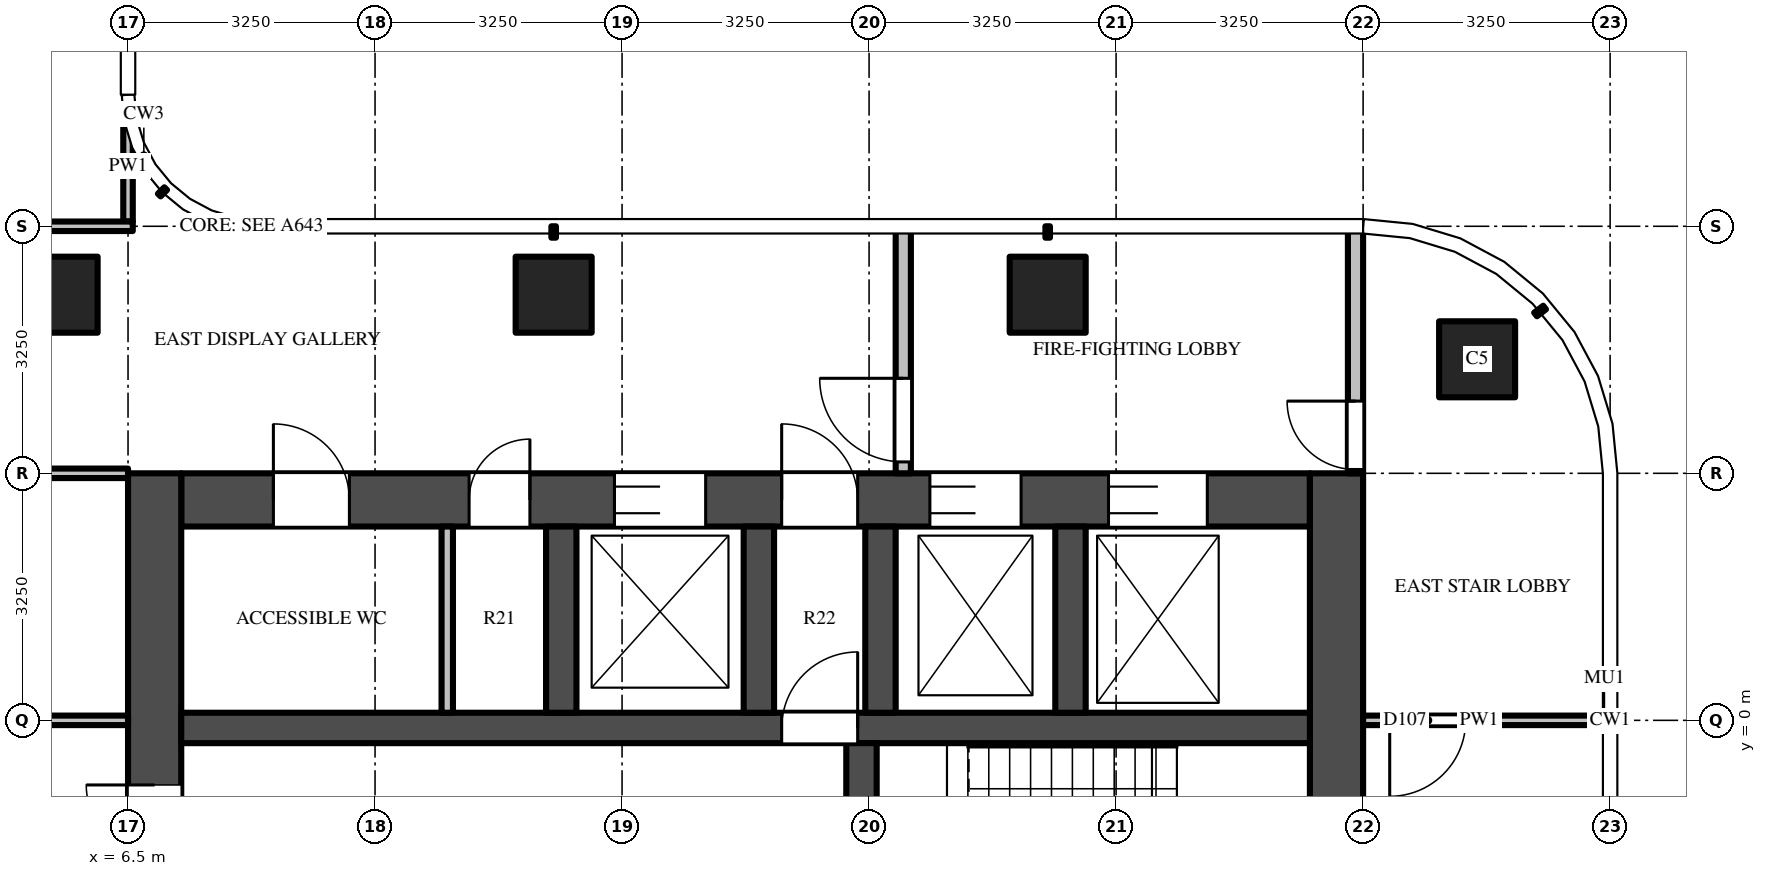
"""IFC4 building model, lengths in metres.
Left out: names, types, materials, properties, quantities, classifications, styles, units other than length and angle.
Written with IfcOpenShell. Run it as: python <this file> out.ifc"""

import sys

from ifc_helpers import new_model, si_unit, direction, frame, frame_2d, origin, origin_2d, place, context, subcontext, project, spatial, rectangle, extrude, source, transform, mapped, element, fill, save


model = new_model("IFC4")
c1 = context("Model", 3, precision=1e-05, world=origin(), true_north=direction((0.0, 1.0)))
c2 = subcontext(c1, "Body", "Model", "MODEL_VIEW")
j1 = project(units=[si_unit("LENGTHUNIT", "METRE"), si_unit("PLANEANGLEUNIT", "RADIAN")], contexts=[c1])
p1 = place(None, origin())
s1 = spatial("IfcSite", under=j1, at=p1, CompositionType="ELEMENT")
p2 = place(p1, origin())
s2 = spatial("IfcBuilding", under=s1, at=p2, CompositionType="ELEMENT")
p3 = place(p2, frame((0.0, 0.0, 326.2)))
s3 = spatial("IfcBuildingStorey", under=s2, at=p3, CompositionType="ELEMENT", Elevation=326.2)
m1 = source(origin(), c2, "Body", "SweptSolid", [
    extrude(rectangle(XDim=1.0, YDim=1.0, at=origin_2d()), origin(), (0.0, 0.0, 1.0), 3.9),
])
for number, where, z_axis, x_axis in (
    (1, (12.1, 5.6, 0.0), (0.0, 0.0, 1.0), (1.0, 0.0, 0.0)),
    (2, (18.6, 5.6, 0.0), (0.0, 0.0, 1.0), (1.0, 0.0, 0.0)),
    (3, (24.25, 4.75, 0.0), (0.0, 0.0, 1.0), (1.0, 0.0, 0.0)),
    (4, (5.6, 5.6, 0.0), (0.0, 0.0, 1.0), (1.0, 0.0, 0.0)),
):
    element("IfcColumn", number, at=place(p3, frame(where, z_axis=z_axis, x_axis=x_axis)), inside=s3, PredefinedType="COLUMN", context=c2, shape_type="MappedRepresentation", body=[
        mapped(m1, transform((0.0, 0.0, 0.0))),
    ])
m2 = source(origin(), c2, "Body", "SweptSolid", [
    extrude(rectangle(XDim=14.85, YDim=0.7, at=frame_2d((7.425, 0.0))), origin(), (0.0, 0.0, 1.0), 3.5),
])
p4 = place(p3, frame((7.2, 2.9, 0.0), z_axis=(0.0, 0.0, 1.0), x_axis=(1.0, 0.0, 0.0)))
e5 = element("IfcWall", 5, at=p4, inside=s3, PredefinedType="SHEAR", context=c2, shape_type="MappedRepresentation", body=[
    mapped(m2, transform((0.0, 0.0, 0.0))),
])
m3 = source(origin(), c2, "Body", "SweptSolid", [
    extrude(rectangle(XDim=1.2, YDim=2.1, at=frame_2d((0.6, 1.05))), frame((0.0, 0.36, 0.0), z_axis=(0.0, -1.0, 0.0), x_axis=(1.0, 0.0, 0.0)), (0.0, 0.0, 1.0), 0.72),
])
p5 = place(p4, frame((5.7, 0.0, 0.0)))
e6 = element("IfcOpeningElement", 6, at=p5, cuts=e5, PredefinedType="OPENING", context=c2, shape_type="MappedRepresentation", body=[
    mapped(m3, transform((0.0, 0.0, 0.0))),
])
m4 = source(origin(), c2, "Body", "SweptSolid", [
    extrude(rectangle(XDim=1.3, YDim=2.1, at=frame_2d((0.65, 1.05))), frame((0.0, 0.36, 0.0), z_axis=(0.0, -1.0, 0.0), x_axis=(1.0, 0.0, 0.0)), (0.0, 0.0, 1.0), 0.72),
])
p6 = place(p4, frame((12.2, 0.0, 0.0)))
e7 = element("IfcOpeningElement", 7, at=p6, cuts=e5, PredefinedType="OPENING", context=c2, shape_type="MappedRepresentation", body=[
    mapped(m4, transform((0.0, 0.0, 0.0))),
])
p7 = place(p4, frame((9.85, 0.0, 0.0)))
e8 = element("IfcOpeningElement", 8, at=p7, cuts=e5, PredefinedType="OPENING", context=c2, shape_type="MappedRepresentation", body=[
    mapped(m3, transform((0.0, 0.0, 0.0))),
])
m5 = source(origin(), c2, "Body", "SweptSolid", [
    extrude(rectangle(XDim=1.0, YDim=2.1, at=frame_2d((0.5, 1.05))), frame((0.0, 0.36, 0.0), z_axis=(0.0, -1.0, 0.0), x_axis=(1.0, 0.0, 0.0)), (0.0, 0.0, 1.0), 0.72),
])
p8 = place(p4, frame((7.9, 0.0, 0.0)))
e9 = element("IfcOpeningElement", 9, at=p8, cuts=e5, PredefinedType="OPENING", context=c2, shape_type="MappedRepresentation", body=[
    mapped(m5, transform((0.0, 0.0, 0.0))),
])
p9 = place(p4, frame((1.212, 0.0, 0.0)))
e10 = element("IfcOpeningElement", 10, at=p9, cuts=e5, PredefinedType="OPENING", context=c2, shape_type="MappedRepresentation", body=[
    mapped(m5, transform((0.0, 0.0, 0.0))),
])
m6 = source(origin(), c2, "Body", "SweptSolid", [
    extrude(rectangle(XDim=0.8, YDim=2.1, at=frame_2d((0.4, 1.05))), frame((0.0, 0.36, 0.0), z_axis=(0.0, -1.0, 0.0), x_axis=(1.0, 0.0, 0.0)), (0.0, 0.0, 1.0), 0.72),
])
p10 = place(p4, frame((3.788, 0.0, 0.0)))
e11 = element("IfcOpeningElement", 11, at=p10, cuts=e5, PredefinedType="OPENING", context=c2, shape_type="MappedRepresentation", body=[
    mapped(m6, transform((0.0, 0.0, 0.0))),
])
m7 = source(origin(), c2, "Body", "SweptSolid", [
    extrude(rectangle(XDim=9.05, YDim=0.7, at=frame_2d((4.525, 0.0))), origin(), (0.0, 0.0, 1.0), 3.5),
])
p11 = place(p3, frame((6.85, -5.8, 0.0), z_axis=(0.0, 0.0, 1.0), x_axis=(0.0, 1.0, 0.0)))
e12 = element("IfcWall", 12, at=p11, inside=s3, PredefinedType="SHEAR", context=c2, shape_type="MappedRepresentation", body=[
    mapped(m7, transform((0.0, 0.0, 0.0))),
])
m8 = source(origin(), c2, "Body", "SweptSolid", [
    extrude(rectangle(XDim=1.8, YDim=2.1, at=frame_2d((0.9, 1.05))), frame((0.0, 0.36, 0.0), z_axis=(0.0, -1.0, 0.0), x_axis=(1.0, 0.0, 0.0)), (0.0, 0.0, 1.0), 0.72),
])
p12 = place(p11, frame((3.15, 0.0, 0.0)))
e13 = element("IfcOpeningElement", 13, at=p12, cuts=e12, PredefinedType="OPENING", context=c2, shape_type="MappedRepresentation", body=[
    mapped(m8, transform((0.0, 0.0, 0.0))),
])
p13 = place(p3, frame((22.4, -5.8, 0.0), z_axis=(0.0, 0.0, 1.0), x_axis=(0.0, 1.0, 0.0)))
e14 = element("IfcWall", 14, at=p13, inside=s3, PredefinedType="SHEAR", context=c2, shape_type="MappedRepresentation", body=[
    mapped(m7, transform((0.0, 0.0, 0.0))),
])
m9 = source(origin(), c2, "Body", "SweptSolid", [
    extrude(rectangle(XDim=14.85, YDim=0.4, at=frame_2d((7.425, 0.0))), origin(), (0.0, 0.0, 1.0), 3.5),
])
p14 = place(p3, frame((7.2, -0.1, 0.0), z_axis=(0.0, 0.0, 1.0), x_axis=(1.0, 0.0, 0.0)))
e15 = element("IfcWall", 15, at=p14, inside=s3, PredefinedType="SHEAR", context=c2, shape_type="MappedRepresentation", body=[
    mapped(m9, transform((0.0, 0.0, 0.0))),
])
m10 = source(origin(), c2, "Body", "SweptSolid", [
    extrude(rectangle(XDim=1.0, YDim=2.1, at=frame_2d((0.5, 1.05))), frame((0.0, 0.21, 0.0), z_axis=(0.0, -1.0, 0.0), x_axis=(1.0, 0.0, 0.0)), (0.0, 0.0, 1.0), 0.42),
])
p15 = place(p14, frame((7.9, 0.0, 0.0)))
e16 = element("IfcOpeningElement", 16, at=p15, cuts=e15, PredefinedType="OPENING", context=c2, shape_type="MappedRepresentation", body=[
    mapped(m10, transform((0.0, 0.0, 0.0))),
])
m11 = source(origin(), c2, "Body", "SweptSolid", [
    extrude(rectangle(XDim=5.5, YDim=0.4, at=frame_2d((2.75, 0.0))), origin(), (0.0, 0.0, 1.0), 3.5),
])
p16 = place(p3, frame((16.15, -5.8, 0.0), z_axis=(0.0, 0.0, 1.0), x_axis=(0.0, 1.0, 0.0)))
e17 = element("IfcWall", 17, at=p16, inside=s3, PredefinedType="SHEAR", context=c2, shape_type="MappedRepresentation", body=[
    mapped(m11, transform((0.0, 0.0, 0.0))),
])
m12 = source(origin(), c2, "Body", "SweptSolid", [
    extrude(rectangle(XDim=1.1, YDim=2.1, at=frame_2d((0.55, 1.05))), frame((0.0, 0.21, 0.0), z_axis=(0.0, -1.0, 0.0), x_axis=(1.0, 0.0, 0.0)), (0.0, 0.0, 1.0), 0.42),
])
p17 = place(p16, frame((0.725, 0.0, 0.0)))
e18 = element("IfcOpeningElement", 18, at=p17, cuts=e17, PredefinedType="OPENING", context=c2, shape_type="MappedRepresentation", body=[
    mapped(m12, transform((0.0, 0.0, 0.0))),
])
p18 = place(p16, frame((3.675, 0.0, 0.0)))
e19 = element("IfcOpeningElement", 19, at=p18, cuts=e17, PredefinedType="OPENING", context=c2, shape_type="MappedRepresentation", body=[
    mapped(m12, transform((0.0, 0.0, 0.0))),
])
m13 = source(origin(), c2, "Body", "SweptSolid", [
    extrude(rectangle(XDim=2.45, YDim=0.4, at=frame_2d((1.225, 0.0))), origin(), (0.0, 0.0, 1.0), 3.5),
])
for number, where, z_axis, x_axis in (
    (20, (12.2, 0.1, 0.0), (0.0, 0.0, 1.0), (0.0, 1.0, 0.0)),
    (21, (14.8, 0.1, 0.0), (0.0, 0.0, 1.0), (0.0, 1.0, 0.0)),
    (22, (16.4, 0.1, 0.0), (0.0, 0.0, 1.0), (0.0, 1.0, 0.0)),
    (23, (18.9, 0.1, 0.0), (0.0, 0.0, 1.0), (0.0, 1.0, 0.0)),
):
    element("IfcWall", number, at=place(p3, frame(where, z_axis=z_axis, x_axis=x_axis)), inside=s3, PredefinedType="SHEAR", context=c2, shape_type="MappedRepresentation", body=[
        mapped(m13, transform((0.0, 0.0, 0.0))),
    ])
m14 = source(origin(), c2, "Body", "SweptSolid", [
    extrude(rectangle(XDim=3.25, YDim=0.2, at=frame_2d((1.625, 0.0))), origin(), (0.0, 0.0, 1.0), 3.5),
])
p19 = place(p3, frame((16.7, 3.25, 0.0), z_axis=(0.0, 0.0, 1.0), x_axis=(0.0, 1.0, 0.0)))
e24 = element("IfcWall", 24, at=p19, inside=s3, PredefinedType="PARTITIONING", context=c2, shape_type="MappedRepresentation", body=[
    mapped(m14, transform((0.0, 0.0, 0.0))),
])
m15 = source(origin(), c2, "Body", "SweptSolid", [
    extrude(rectangle(XDim=1.1, YDim=2.1, at=frame_2d((0.55, 1.05))), frame((0.0, 0.11, 0.0), z_axis=(0.0, -1.0, 0.0), x_axis=(1.0, 0.0, 0.0)), (0.0, 0.0, 1.0), 0.22),
])
p20 = place(p19, frame((0.15, 0.0, 0.0)))
e25 = element("IfcOpeningElement", 25, at=p20, cuts=e24, PredefinedType="OPENING", context=c2, shape_type="MappedRepresentation", body=[
    mapped(m15, transform((0.0, 0.0, 0.0))),
])
p21 = place(p3, frame((22.65, 3.25, 0.0), z_axis=(0.0, 0.0, 1.0), x_axis=(0.0, 1.0, 0.0)))
e26 = element("IfcWall", 26, at=p21, inside=s3, PredefinedType="PARTITIONING", context=c2, shape_type="MappedRepresentation", body=[
    mapped(m14, transform((0.0, 0.0, 0.0))),
])
m16 = source(origin(), c2, "Body", "SweptSolid", [
    extrude(rectangle(XDim=0.9, YDim=2.1, at=frame_2d((0.45, 1.05))), frame((0.0, 0.11, 0.0), z_axis=(0.0, -1.0, 0.0), x_axis=(1.0, 0.0, 0.0)), (0.0, 0.0, 1.0), 0.22),
])
p22 = place(p21, frame((0.05, 0.0, 0.0)))
e27 = element("IfcOpeningElement", 27, at=p22, cuts=e26, PredefinedType="OPENING", context=c2, shape_type="MappedRepresentation", body=[
    mapped(m16, transform((0.0, 0.0, 0.0))),
])
m17 = source(origin(), c2, "Body", "SweptSolid", [
    extrude(rectangle(XDim=2.45, YDim=0.15, at=frame_2d((1.225, 0.0))), origin(), (0.0, 0.0, 1.0), 3.5),
])
p23 = place(p3, frame((10.7, 0.1, 0.0), z_axis=(0.0, 0.0, 1.0), x_axis=(0.0, 1.0, 0.0)))
e28 = element("IfcWall", 28, at=p23, inside=s3, PredefinedType="PARTITIONING", context=c2, shape_type="MappedRepresentation", body=[
    mapped(m17, transform((0.0, 0.0, 0.0))),
])
m18 = source(origin(), c2, "Body", "SweptSolid", [
    extrude(rectangle(XDim=1.469, YDim=0.125, at=frame_2d((0.734, 0.0))), origin(), (0.0, 0.0, 1.0), 3.5),
])
p24 = place(p3, frame((6.5, 6.562, 0.0), z_axis=(0.0, 0.0, 1.0), x_axis=(0.0, 1.0, 0.0)))
e29 = element("IfcWall", 29, at=p24, inside=s3, PredefinedType="PARTITIONING", context=c2, shape_type="MappedRepresentation", body=[
    mapped(m18, transform((0.0, 0.0, 0.0))),
])
m19 = source(origin(), c2, "Body", "SweptSolid", [
    extrude(rectangle(XDim=5.363, YDim=0.125, at=frame_2d((2.681, 0.0))), origin(), (0.0, 0.0, 1.0), 2.718),
])
p25 = place(p3, frame((6.5, 0.0, 0.0), z_axis=(0.0, 0.0, 1.0), x_axis=(-1.0, 0.0, 0.0)))
e30 = element("IfcWall", 30, at=p25, inside=s3, PredefinedType="PARTITIONING", context=c2, shape_type="MappedRepresentation", body=[
    mapped(m19, transform((0.0, 0.0, 0.0))),
])
m20 = source(origin(), c2, "Body", "SweptSolid", [
    extrude(rectangle(XDim=1.0, YDim=2.1, at=frame_2d((0.5, 1.05))), frame((0.0, 0.073, 0.0), z_axis=(0.0, -1.0, 0.0), x_axis=(1.0, 0.0, 0.0)), (0.0, 0.0, 1.0), 0.145),
])
p26 = place(p25, frame((3.95, 0.0, 0.0)))
e31 = element("IfcOpeningElement", 31, at=p26, cuts=e30, PredefinedType="OPENING", context=c2, shape_type="MappedRepresentation", body=[
    mapped(m20, transform((0.0, 0.0, 0.0))),
])
m21 = source(origin(), c2, "Body", "SweptSolid", [
    extrude(rectangle(XDim=3.05, YDim=0.125, at=frame_2d((1.525, 0.0))), origin(), (0.0, 0.0, 1.0), 2.58),
])
p27 = place(p3, frame((25.8, 0.0, 0.0), z_axis=(0.0, 0.0, 1.0), x_axis=(-1.0, 0.0, 0.0)))
e32 = element("IfcWall", 32, at=p27, inside=s3, PredefinedType="PARTITIONING", context=c2, shape_type="MappedRepresentation", body=[
    mapped(m21, transform((0.0, 0.0, 0.0))),
])
p28 = place(p27, frame((1.7, 0.0, 0.0)))
e33 = element("IfcOpeningElement", 33, at=p28, cuts=e32, PredefinedType="OPENING", context=c2, shape_type="MappedRepresentation", body=[
    mapped(m20, transform((0.0, 0.0, 0.0))),
])
p29 = place(p3, frame((1.137, 3.25, 0.0), z_axis=(0.0, 0.0, 1.0), x_axis=(1.0, 0.0, 0.0)))
e34 = element("IfcWall", 34, at=p29, inside=s3, PredefinedType="PARTITIONING", context=c2, shape_type="MappedRepresentation", body=[
    mapped(m19, transform((0.0, 0.0, 0.0))),
])
m22 = source(origin(), c2, "Body", "SweptSolid", [
    extrude(rectangle(XDim=5.425, YDim=0.125, at=frame_2d((2.712, 0.0))), origin(), (0.0, 0.0, 1.0), 2.58),
])
p30 = place(p3, frame((1.137, 6.5, 0.0), z_axis=(0.0, 0.0, 1.0), x_axis=(1.0, 0.0, 0.0)))
e35 = element("IfcWall", 35, at=p30, inside=s3, PredefinedType="PARTITIONING", context=c2, shape_type="MappedRepresentation", body=[
    mapped(m22, transform((0.0, 0.0, 0.0))),
])
m23 = source(origin(), c2, "Body", "SweptSolid", [
    extrude(rectangle(XDim=1.2, YDim=2.1, at=frame_2d((0.6, 1.05))), frame((0.0, -0.275, 0.0), z_axis=(0.0, -1.0, 0.0), x_axis=(1.0, 0.0, 0.0)), (0.0, 0.0, 1.0), 0.05),
])
p31 = place(p5, origin())
e36 = element("IfcDoor", 36, at=p31, inside=s3, OperationType="DOUBLE_DOOR_SLIDING", PredefinedType="DOOR", context=c2, shape_type="MappedRepresentation", body=[
    mapped(m23, transform((0.0, 0.0, 0.0))),
])
fill(e6, e36)
m24 = source(origin(), c2, "Body", "SweptSolid", [
    extrude(rectangle(XDim=1.3, YDim=2.1, at=frame_2d((0.65, 1.05))), frame((0.0, -0.275, 0.0), z_axis=(0.0, -1.0, 0.0), x_axis=(1.0, 0.0, 0.0)), (0.0, 0.0, 1.0), 0.05),
])
p32 = place(p6, origin())
e37 = element("IfcDoor", 37, at=p32, inside=s3, OperationType="DOUBLE_DOOR_SLIDING", PredefinedType="DOOR", context=c2, shape_type="MappedRepresentation", body=[
    mapped(m24, transform((0.0, 0.0, 0.0))),
])
fill(e7, e37)
p33 = place(p7, origin())
e38 = element("IfcDoor", 38, at=p33, inside=s3, OperationType="DOUBLE_DOOR_SLIDING", PredefinedType="DOOR", context=c2, shape_type="MappedRepresentation", body=[
    mapped(m23, transform((0.0, 0.0, 0.0))),
])
fill(e8, e38)
m25 = source(origin(), c2, "Body", "SweptSolid", [
    extrude(rectangle(XDim=1.8, YDim=2.1, at=frame_2d((0.9, 1.05))), frame((0.0, -0.275, 0.0), z_axis=(0.0, -1.0, 0.0), x_axis=(1.0, 0.0, 0.0)), (0.0, 0.0, 1.0), 0.05),
])
p34 = place(p12, origin())
e39 = element("IfcDoor", 39, at=p34, inside=s3, OperationType="DOUBLE_DOOR_SINGLE_SWING", PredefinedType="DOOR", context=c2, shape_type="MappedRepresentation", body=[
    mapped(m25, transform((0.0, 0.0, 0.0))),
])
fill(e13, e39)
m26 = source(origin(), c2, "Body", "SweptSolid", [
    extrude(rectangle(XDim=1.0, YDim=2.1, at=frame_2d((0.5, 1.05))), frame((0.0, 0.025, 0.0), z_axis=(0.0, -1.0, 0.0), x_axis=(1.0, 0.0, 0.0)), (0.0, 0.0, 1.0), 0.05),
])
p35 = place(p15, origin())
e40 = element("IfcDoor", 40, at=p35, inside=s3, OperationType="SINGLE_SWING_RIGHT", PredefinedType="DOOR", context=c2, shape_type="MappedRepresentation", body=[
    mapped(m26, transform((0.0, 0.0, 0.0))),
])
fill(e16, e40)
m27 = source(origin(), c2, "Body", "SweptSolid", [
    extrude(rectangle(XDim=1.0, YDim=2.1, at=frame_2d((0.5, 1.05))), frame((0.0, -0.275, 0.0), z_axis=(0.0, -1.0, 0.0), x_axis=(1.0, 0.0, 0.0)), (0.0, 0.0, 1.0), 0.05),
])
p36 = place(p8, origin())
e41 = element("IfcDoor", 41, at=p36, inside=s3, OperationType="SINGLE_SWING_LEFT", PredefinedType="DOOR", context=c2, shape_type="MappedRepresentation", body=[
    mapped(m27, transform((0.0, 0.0, 0.0))),
])
fill(e9, e41)
m28 = source(origin(), c2, "Body", "SweptSolid", [
    extrude(rectangle(XDim=1.1, YDim=2.1, at=frame_2d((0.55, 1.05))), frame((0.0, 0.025, 0.0), z_axis=(0.0, -1.0, 0.0), x_axis=(1.0, 0.0, 0.0)), (0.0, 0.0, 1.0), 0.05),
])
p37 = place(p20, origin())
e42 = element("IfcDoor", 42, at=p37, inside=s3, OperationType="SINGLE_SWING_RIGHT", PredefinedType="DOOR", context=c2, shape_type="MappedRepresentation", body=[
    mapped(m28, transform((0.0, 0.0, 0.0))),
])
fill(e25, e42)
m29 = source(origin(), c2, "Body", "SweptSolid", [
    extrude(rectangle(XDim=0.9, YDim=2.1, at=frame_2d((0.45, 1.05))), frame((0.0, 0.025, 0.0), z_axis=(0.0, -1.0, 0.0), x_axis=(1.0, 0.0, 0.0)), (0.0, 0.0, 1.0), 0.05),
])
p38 = place(p22, origin())
e43 = element("IfcDoor", 43, at=p38, inside=s3, OperationType="SINGLE_SWING_RIGHT", PredefinedType="DOOR", context=c2, shape_type="MappedRepresentation", body=[
    mapped(m29, transform((0.0, 0.0, 0.0))),
])
fill(e27, e43)
p39 = place(p9, origin())
e44 = element("IfcDoor", 44, at=p39, inside=s3, OperationType="SINGLE_SWING_LEFT", PredefinedType="DOOR", context=c2, shape_type="MappedRepresentation", body=[
    mapped(m27, transform((0.0, 0.0, 0.0))),
])
fill(e10, e44)
m30 = source(origin(), c2, "Body", "SweptSolid", [
    extrude(rectangle(XDim=0.8, YDim=2.1, at=frame_2d((0.4, 1.05))), frame((0.0, -0.275, 0.0), z_axis=(0.0, -1.0, 0.0), x_axis=(1.0, 0.0, 0.0)), (0.0, 0.0, 1.0), 0.05),
])
p40 = place(p10, origin())
e45 = element("IfcDoor", 45, at=p40, inside=s3, OperationType="SINGLE_SWING_RIGHT", PredefinedType="DOOR", context=c2, shape_type="MappedRepresentation", body=[
    mapped(m30, transform((0.0, 0.0, 0.0))),
])
fill(e11, e45)
p41 = place(p28, origin())
e46 = element("IfcDoor", 46, at=p41, inside=s3, OperationType="SINGLE_SWING_RIGHT", PredefinedType="DOOR", context=c2, shape_type="MappedRepresentation", body=[
    mapped(m26, transform((0.0, 0.0, 0.0))),
])
fill(e33, e46)
save(model, sys.argv[1])
